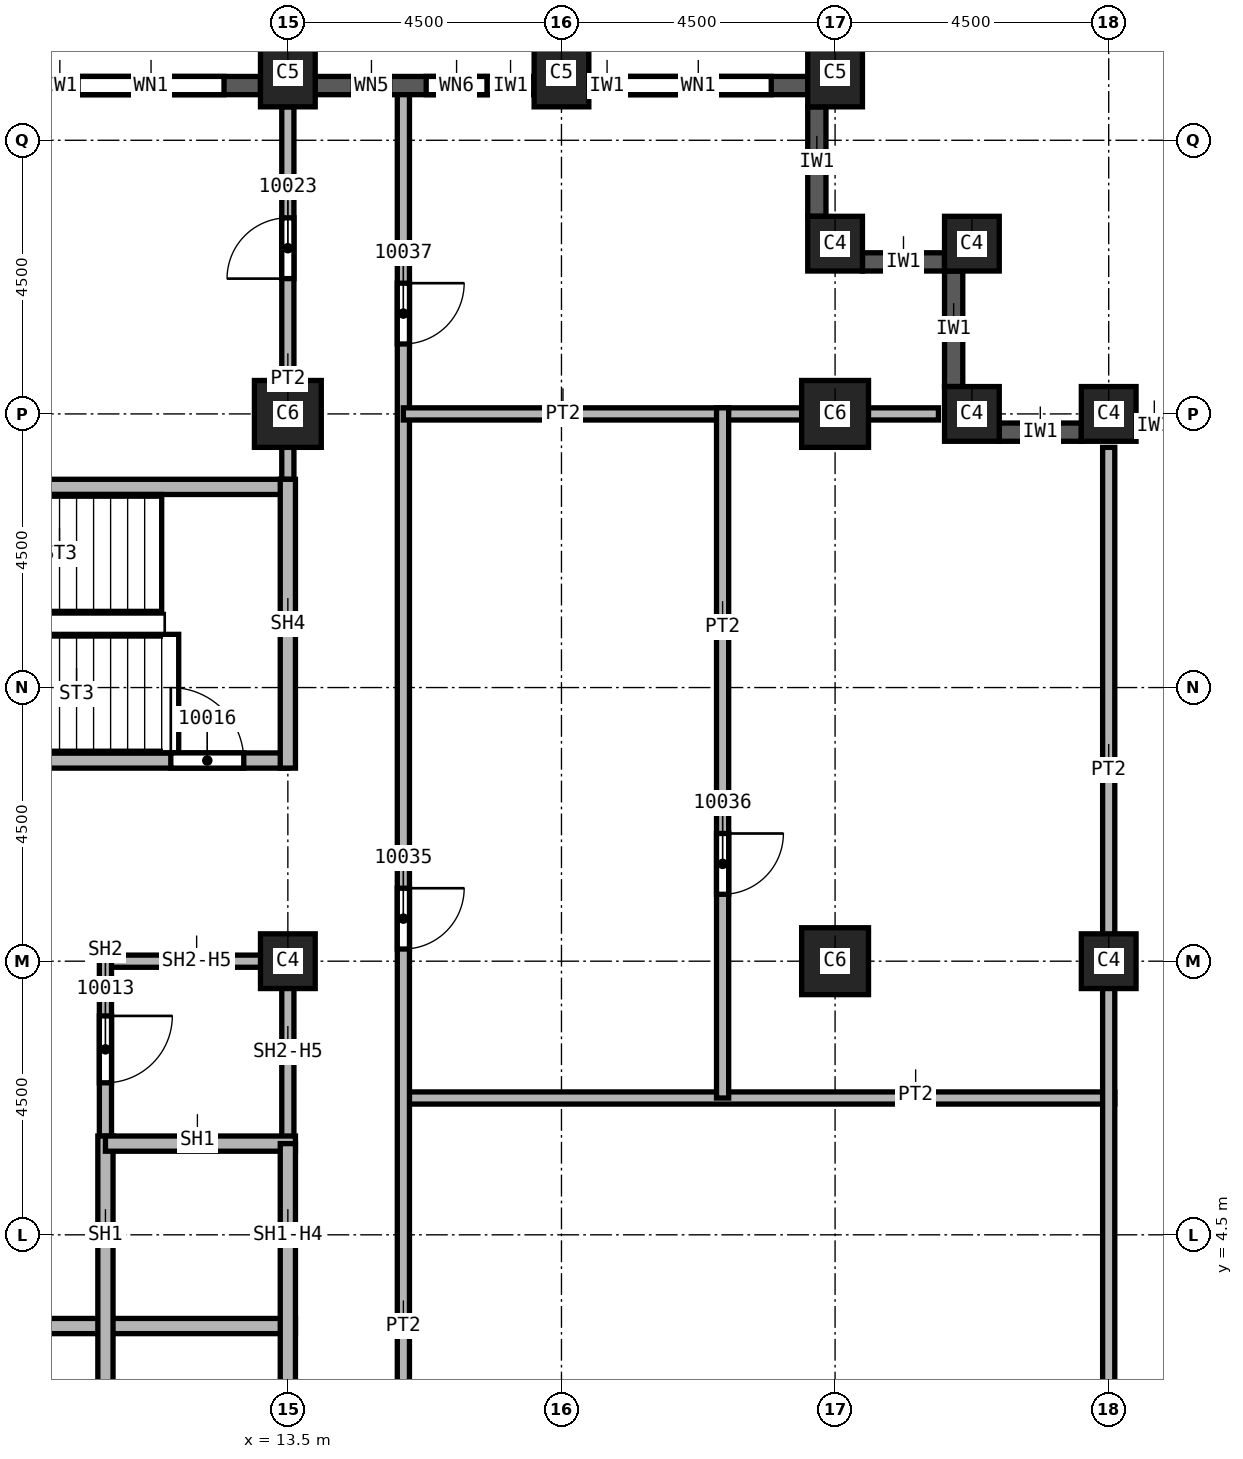
"""IFC4 building model, lengths in metres.
Left out: names, types, materials, properties, quantities, classifications, styles, units other than length and angle.
Written with IfcOpenShell. Run it as: python <this file> out.ifc"""

import sys

from ifc_helpers import new_model, si_unit, direction, frame, frame_2d, origin, origin_2d, place, context, subcontext, project, spatial, rectangle, extrude, element, fill, save


model = new_model("IFC4")
c1 = context("Model", 3, precision=1e-05, world=origin(), true_north=direction((0.0, 1.0)))
c2 = subcontext(c1, "Body", "Model", "MODEL_VIEW")
j1 = project(units=[si_unit("LENGTHUNIT", "METRE"), si_unit("PLANEANGLEUNIT", "RADIAN")], contexts=[c1])
p1 = place(None, origin())
s1 = spatial("IfcSite", under=j1, at=p1, CompositionType="ELEMENT")
p2 = place(p1, origin())
s2 = spatial("IfcBuilding", under=s1, at=p2, CompositionType="ELEMENT")
p3 = place(p2, frame((0.0, 0.0, 174.0)))
s3 = spatial("IfcBuildingStorey", under=s2, at=p3, CompositionType="ELEMENT", Elevation=174.0)
for number, where, z_axis, x_axis in (
    (1, (13.5, 18.0, 0.0), (0.0, 0.0, 1.0), (1.0, 0.0, 0.0)),
    (2, (22.5, 9.0, 0.0), (0.0, 0.0, 1.0), (1.0, 0.0, 0.0)),
    (3, (22.5, 18.0, 0.0), (0.0, 0.0, 1.0), (1.0, 0.0, 0.0)),
):
    element("IfcColumn", number, at=place(p3, frame(where, z_axis=z_axis, x_axis=x_axis)), inside=s3, PredefinedType="COLUMN", context=c2, shape_type="SweptSolid", body=[
        extrude(rectangle(XDim=1.1, YDim=1.1, at=origin_2d()), origin(), (0.0, 0.0, 1.0), 3.59),
    ])
for number, where, z_axis, x_axis in (
    (4, (13.5, 9.0, 0.0), (0.0, 0.0, 1.0), (1.0, 0.0, 0.0)),
    (5, (27.0, 9.0, 0.0), (0.0, 0.0, 1.0), (1.0, 0.0, 0.0)),
    (6, (27.0, 18.0, 0.0), (0.0, 0.0, 1.0), (1.0, 0.0, 0.0)),
):
    element("IfcColumn", number, at=place(p3, frame(where, z_axis=z_axis, x_axis=x_axis)), inside=s3, PredefinedType="COLUMN", context=c2, shape_type="SweptSolid", body=[
        extrude(rectangle(XDim=0.9, YDim=0.9, at=origin_2d()), origin(), (0.0, 0.0, 1.0), 3.59),
    ])
for number, where, z_axis, x_axis in (
    (7, (13.5, 23.6, 0.0), (0.0, 0.0, 1.0), (1.0, 0.0, 0.0)),
    (8, (18.0, 23.6, 0.0), (0.0, 0.0, 1.0), (1.0, 0.0, 0.0)),
    (9, (22.5, 23.6, 0.0), (0.0, 0.0, 1.0), (1.0, 0.0, 0.0)),
):
    element("IfcColumn", number, at=place(p3, frame(where, z_axis=z_axis, x_axis=x_axis)), inside=s3, PredefinedType="COLUMN", context=c2, shape_type="SweptSolid", body=[
        extrude(rectangle(XDim=0.9, YDim=1.1, at=origin_2d()), origin(), (0.0, 0.0, 1.0), 3.59),
    ])
for number, where, z_axis, x_axis in (
    (10, (22.5, 20.8, 0.0), (0.0, 0.0, 1.0), (1.0, 0.0, 0.0)),
    (11, (24.75, 20.8, 0.0), (0.0, 0.0, 1.0), (1.0, 0.0, 0.0)),
    (12, (24.75, 18.0, 0.0), (0.0, 0.0, 1.0), (1.0, 0.0, 0.0)),
):
    element("IfcColumn", number, at=place(p3, frame(where, z_axis=z_axis, x_axis=x_axis)), inside=s3, PredefinedType="COLUMN", context=c2, shape_type="SweptSolid", body=[
        extrude(rectangle(XDim=0.9, YDim=0.9, at=origin_2d()), origin(), (0.0, 0.0, 1.0), 3.59),
    ])
p4 = place(p3, frame((31.05, 17.8, 0.0), z_axis=(0.0, 0.0, 1.0), x_axis=(-1.0, 0.0, 0.0)))
e13 = element("IfcWall", 13, at=p4, inside=s3, PredefinedType="SOLIDWALL", context=c2, shape_type="SweptSolid", body=[
    extrude(rectangle(XDim=3.6, YDim=0.3, at=frame_2d((1.8, 0.0))), origin(), (0.0, 0.0, 1.0), 2.99),
])
p5 = place(p4, frame((0.6, 0.0, 0.8)))
e14 = element("IfcOpeningElement", 14, at=p5, cuts=e13, PredefinedType="OPENING", context=c2, shape_type="SweptSolid", body=[
    extrude(rectangle(XDim=1.0, YDim=1.95, at=frame_2d((0.5, 0.975))), frame((0.0, 0.15, 0.0), z_axis=(0.0, -1.0, 0.0), x_axis=(1.0, 0.0, 0.0)), (0.0, 0.0, 1.0), 0.3),
])
p6 = place(p4, frame((2.0, 0.0, 0.8)))
e15 = element("IfcOpeningElement", 15, at=p6, cuts=e13, PredefinedType="OPENING", context=c2, shape_type="SweptSolid", body=[
    extrude(rectangle(XDim=1.0, YDim=1.95, at=frame_2d((0.5, 0.975))), frame((0.0, 0.15, 0.0), z_axis=(0.0, -1.0, 0.0), x_axis=(1.0, 0.0, 0.0)), (0.0, 0.0, 1.0), 0.3),
])
p7 = place(p3, frame((26.55, 17.7, 0.0), z_axis=(0.0, 0.0, 1.0), x_axis=(-1.0, 0.0, 0.0)))
e16 = element("IfcWall", 16, at=p7, inside=s3, PredefinedType="SOLIDWALL", context=c2, shape_type="SweptSolid", body=[
    extrude(rectangle(XDim=1.35, YDim=0.3, at=frame_2d((0.675, 0.0))), origin(), (0.0, 0.0, 1.0), 2.99),
])
p8 = place(p3, frame((24.45, 18.45, 0.0), z_axis=(0.0, 0.0, 1.0), x_axis=(0.0, 1.0, 0.0)))
e17 = element("IfcWall", 17, at=p8, inside=s3, PredefinedType="SOLIDWALL", context=c2, shape_type="SweptSolid", body=[
    extrude(rectangle(XDim=1.9, YDim=0.3, at=frame_2d((0.95, 0.0))), origin(), (0.0, 0.0, 1.0), 2.99),
])
p9 = place(p3, frame((24.3, 20.5, 0.0), z_axis=(0.0, 0.0, 1.0), x_axis=(-1.0, 0.0, 0.0)))
e18 = element("IfcWall", 18, at=p9, inside=s3, PredefinedType="SOLIDWALL", context=c2, shape_type="SweptSolid", body=[
    extrude(rectangle(XDim=1.35, YDim=0.3, at=frame_2d((0.675, 0.0))), origin(), (0.0, 0.0, 1.0), 2.99),
])
p10 = place(p3, frame((22.2, 21.25, 0.0), z_axis=(0.0, 0.0, 1.0), x_axis=(0.0, 1.0, 0.0)))
e19 = element("IfcWall", 19, at=p10, inside=s3, PredefinedType="SOLIDWALL", context=c2, shape_type="SweptSolid", body=[
    extrude(rectangle(XDim=1.8, YDim=0.3, at=frame_2d((0.9, 0.0))), origin(), (0.0, 0.0, 1.0), 2.99),
])
p11 = place(p3, frame((22.05, 23.4, 0.0), z_axis=(0.0, 0.0, 1.0), x_axis=(-1.0, 0.0, 0.0)))
e20 = element("IfcWall", 20, at=p11, inside=s3, PredefinedType="SOLIDWALL", context=c2, shape_type="SweptSolid", body=[
    extrude(rectangle(XDim=3.6, YDim=0.3, at=frame_2d((1.8, 0.0))), origin(), (0.0, 0.0, 1.0), 2.99),
])
p12 = place(p11, frame((0.6, 0.0, 0.8)))
e21 = element("IfcOpeningElement", 21, at=p12, cuts=e20, PredefinedType="OPENING", context=c2, shape_type="SweptSolid", body=[
    extrude(rectangle(XDim=2.4, YDim=1.95, at=frame_2d((1.2, 0.975))), frame((0.0, 0.15, 0.0), z_axis=(0.0, -1.0, 0.0), x_axis=(1.0, 0.0, 0.0)), (0.0, 0.0, 1.0), 0.3),
])
p13 = place(p3, frame((17.55, 23.4, 0.0), z_axis=(0.0, 0.0, 1.0), x_axis=(-1.0, 0.0, 0.0)))
e22 = element("IfcWall", 22, at=p13, inside=s3, PredefinedType="SOLIDWALL", context=c2, shape_type="SweptSolid", body=[
    extrude(rectangle(XDim=3.6, YDim=0.3, at=frame_2d((1.8, 0.0))), origin(), (0.0, 0.0, 1.0), 2.99),
])
p14 = place(p13, frame((0.775, 0.0, 0.8)))
e23 = element("IfcOpeningElement", 23, at=p14, cuts=e22, PredefinedType="OPENING", context=c2, shape_type="SweptSolid", body=[
    extrude(rectangle(XDim=1.0, YDim=1.95, at=frame_2d((0.5, 0.975))), frame((0.0, 0.15, 0.0), z_axis=(0.0, -1.0, 0.0), x_axis=(1.0, 0.0, 0.0)), (0.0, 0.0, 1.0), 0.3),
])
p15 = place(p13, frame((2.375, 0.0, 0.8)))
e24 = element("IfcOpeningElement", 24, at=p15, cuts=e22, PredefinedType="OPENING", context=c2, shape_type="SweptSolid", body=[
    extrude(rectangle(XDim=0.6, YDim=1.95, at=frame_2d((0.3, 0.975))), frame((0.0, 0.15, 0.0), z_axis=(0.0, -1.0, 0.0), x_axis=(1.0, 0.0, 0.0)), (0.0, 0.0, 1.0), 0.3),
])
p16 = place(p3, frame((13.05, 23.4, 0.0), z_axis=(0.0, 0.0, 1.0), x_axis=(-1.0, 0.0, 0.0)))
e25 = element("IfcWall", 25, at=p16, inside=s3, PredefinedType="SOLIDWALL", context=c2, shape_type="SweptSolid", body=[
    extrude(rectangle(XDim=3.6, YDim=0.3, at=frame_2d((1.8, 0.0))), origin(), (0.0, 0.0, 1.0), 2.99),
])
p17 = place(p16, frame((0.6, 0.0, 0.8)))
e26 = element("IfcOpeningElement", 26, at=p17, cuts=e25, PredefinedType="OPENING", context=c2, shape_type="SweptSolid", body=[
    extrude(rectangle(XDim=2.4, YDim=1.95, at=frame_2d((1.2, 0.975))), frame((0.0, 0.15, 0.0), z_axis=(0.0, -1.0, 0.0), x_axis=(1.0, 0.0, 0.0)), (0.0, 0.0, 1.0), 0.3),
])
p18 = place(p3, frame((13.5, 16.675, 0.0), z_axis=(0.0, 0.0, 1.0), x_axis=(0.0, 1.0, 0.0)))
e27 = element("IfcWall", 27, at=p18, inside=s3, PredefinedType="PARTITIONING", context=c2, shape_type="SweptSolid", body=[
    extrude(rectangle(XDim=6.375, YDim=0.2, at=frame_2d((3.188, 0.0))), origin(), (0.0, 0.0, 1.0), 3.59),
])
p19 = place(p18, frame((3.55, 0.0, 0.0)))
e28 = element("IfcOpeningElement", 28, at=p19, cuts=e27, PredefinedType="OPENING", context=c2, shape_type="SweptSolid", body=[
    extrude(rectangle(XDim=1.0, YDim=2.1, at=frame_2d((0.5, 1.05))), frame((0.0, 0.1, 0.0), z_axis=(0.0, -1.0, 0.0), x_axis=(1.0, 0.0, 0.0)), (0.0, 0.0, 1.0), 0.2),
])
p20 = place(p3, frame((15.4, 6.75, 0.0), z_axis=(0.0, 0.0, 1.0), x_axis=(1.0, 0.0, 0.0)))
e29 = element("IfcWall", 29, at=p20, inside=s3, PredefinedType="PARTITIONING", context=c2, shape_type="SweptSolid", body=[
    extrude(rectangle(XDim=11.7, YDim=0.2, at=frame_2d((5.85, 0.0))), origin(), (0.0, 0.0, 1.0), 3.59),
])
p21 = place(p3, frame((15.4, 23.25, 0.0), z_axis=(0.0, 0.0, 1.0), x_axis=(0.0, -1.0, 0.0)))
e30 = element("IfcWall", 30, at=p21, inside=s3, PredefinedType="PARTITIONING", context=c2, shape_type="SweptSolid", body=[
    extrude(rectangle(XDim=24.1, YDim=0.2, at=frame_2d((12.05, 0.0))), origin(), (0.0, 0.0, 1.0), 3.59),
])
p22 = place(p21, frame((13.05, 0.0, 0.0)))
e31 = element("IfcOpeningElement", 31, at=p22, cuts=e30, PredefinedType="OPENING", context=c2, shape_type="SweptSolid", body=[
    extrude(rectangle(XDim=1.0, YDim=2.1, at=frame_2d((0.5, 1.05))), frame((0.0, 0.1, 0.0), z_axis=(0.0, -1.0, 0.0), x_axis=(1.0, 0.0, 0.0)), (0.0, 0.0, 1.0), 0.2),
])
p23 = place(p21, frame((3.1, 0.0, 0.0)))
e32 = element("IfcOpeningElement", 32, at=p23, cuts=e30, PredefinedType="OPENING", context=c2, shape_type="SweptSolid", body=[
    extrude(rectangle(XDim=1.0, YDim=2.1, at=frame_2d((0.5, 1.05))), frame((0.0, 0.1, 0.0), z_axis=(0.0, -1.0, 0.0), x_axis=(1.0, 0.0, 0.0)), (0.0, 0.0, 1.0), 0.2),
])
p24 = place(p3, frame((15.4, 18.0, 0.0), z_axis=(0.0, 0.0, 1.0), x_axis=(1.0, 0.0, 0.0)))
e33 = element("IfcWall", 33, at=p24, inside=s3, PredefinedType="PARTITIONING", context=c2, shape_type="SweptSolid", body=[
    extrude(rectangle(XDim=8.8, YDim=0.2, at=frame_2d((4.4, 0.0))), origin(), (0.0, 0.0, 1.0), 3.59),
])
p25 = place(p3, frame((20.65, 18.1, 0.0), z_axis=(0.0, 0.0, 1.0), x_axis=(0.0, -1.0, 0.0)))
e34 = element("IfcWall", 34, at=p25, inside=s3, PredefinedType="PARTITIONING", context=c2, shape_type="SweptSolid", body=[
    extrude(rectangle(XDim=11.35, YDim=0.2, at=frame_2d((5.675, 0.0))), origin(), (0.0, 0.0, 1.0), 3.59),
])
p26 = place(p25, frame((7.0, 0.0, 0.0)))
e35 = element("IfcOpeningElement", 35, at=p26, cuts=e34, PredefinedType="OPENING", context=c2, shape_type="SweptSolid", body=[
    extrude(rectangle(XDim=1.0, YDim=2.1, at=frame_2d((0.5, 1.05))), frame((0.0, 0.1, 0.0), z_axis=(0.0, -1.0, 0.0), x_axis=(1.0, 0.0, 0.0)), (0.0, 0.0, 1.0), 0.2),
])
p27 = place(p3, frame((27.0, 17.45, 0.0), z_axis=(0.0, 0.0, 1.0), x_axis=(0.0, -1.0, 0.0)))
e36 = element("IfcWall", 36, at=p27, inside=s3, PredefinedType="PARTITIONING", context=c2, shape_type="SweptSolid", body=[
    extrude(rectangle(XDim=18.2, YDim=0.2, at=frame_2d((9.1, 0.0))), origin(), (0.0, 0.0, 1.0), 3.59),
])
p28 = place(p3, frame((10.5, 9.0, 0.0), z_axis=(0.0, 0.0, 1.0), x_axis=(1.0, 0.0, 0.0)))
e37 = element("IfcWall", 37, at=p28, inside=s3, PredefinedType="SOLIDWALL", context=c2, shape_type="SweptSolid", body=[
    extrude(rectangle(XDim=3.0, YDim=0.2, at=frame_2d((1.5, 0.0))), origin(), (0.0, 0.0, 1.0), 2.828),
])
p29 = place(p3, frame((10.5, 9.1, 0.0), z_axis=(0.0, 0.0, 1.0), x_axis=(0.0, -1.0, 0.0)))
e38 = element("IfcWall", 38, at=p29, inside=s3, PredefinedType="SOLIDWALL", context=c2, shape_type="SweptSolid", body=[
    extrude(rectangle(XDim=3.225, YDim=0.2, at=frame_2d((1.613, 0.0))), origin(), (0.0, 0.0, 1.0), 3.59),
])
p30 = place(p29, frame((1.0, 0.0, 0.0)))
e39 = element("IfcOpeningElement", 39, at=p30, cuts=e38, PredefinedType="OPENING", context=c2, shape_type="SweptSolid", body=[
    extrude(rectangle(XDim=1.1, YDim=2.1, at=frame_2d((0.55, 1.05))), frame((0.0, 0.1, 0.0), z_axis=(0.0, -1.0, 0.0), x_axis=(1.0, 0.0, 0.0)), (0.0, 0.0, 1.0), 0.2),
])
p31 = place(p3, frame((13.5, 9.1, 0.0), z_axis=(0.0, 0.0, 1.0), x_axis=(0.0, -1.0, 0.0)))
e40 = element("IfcWall", 40, at=p31, inside=s3, PredefinedType="SOLIDWALL", context=c2, shape_type="SweptSolid", body=[
    extrude(rectangle(XDim=3.1, YDim=0.2, at=frame_2d((1.55, 0.0))), origin(), (0.0, 0.0, 1.0), 2.828),
])
p32 = place(p3, frame((4.375, 3.0, 0.0), z_axis=(0.0, 0.0, 1.0), x_axis=(1.0, 0.0, 0.0)))
e41 = element("IfcWall", 41, at=p32, inside=s3, PredefinedType="SOLIDWALL", context=c2, shape_type="SweptSolid", body=[
    extrude(rectangle(XDim=9.25, YDim=0.25, at=frame_2d((4.625, 0.0))), origin(), (0.0, 0.0, 1.0), 3.59),
])
p33 = place(p32, frame((3.375, 0.0, 0.0)))
e42 = element("IfcOpeningElement", 42, at=p33, cuts=e41, PredefinedType="OPENING", context=c2, shape_type="SweptSolid", body=[
    extrude(rectangle(XDim=1.1, YDim=2.1, at=frame_2d((0.55, 1.05))), frame((0.0, 0.125, 0.0), z_axis=(0.0, -1.0, 0.0), x_axis=(1.0, 0.0, 0.0)), (0.0, 0.0, 1.0), 0.25),
])
p34 = place(p3, frame((10.5, 6.125, 0.0), z_axis=(0.0, 0.0, 1.0), x_axis=(0.0, -1.0, 0.0)))
e43 = element("IfcWall", 43, at=p34, inside=s3, PredefinedType="SOLIDWALL", context=c2, shape_type="SweptSolid", body=[
    extrude(rectangle(XDim=9.25, YDim=0.25, at=frame_2d((4.625, 0.0))), origin(), (0.0, 0.0, 1.0), 3.59),
])
p35 = place(p34, frame((7.075, 0.0, 0.0)))
e44 = element("IfcOpeningElement", 44, at=p35, cuts=e43, PredefinedType="OPENING", context=c2, shape_type="SweptSolid", body=[
    extrude(rectangle(XDim=1.1, YDim=2.1, at=frame_2d((0.55, 1.05))), frame((0.0, 0.125, 0.0), z_axis=(0.0, -1.0, 0.0), x_axis=(1.0, 0.0, 0.0)), (0.0, 0.0, 1.0), 0.25),
])
p36 = place(p34, frame((4.075, 0.0, 0.0)))
e45 = element("IfcOpeningElement", 45, at=p36, cuts=e43, PredefinedType="OPENING", context=c2, shape_type="SweptSolid", body=[
    extrude(rectangle(XDim=1.1, YDim=2.1, at=frame_2d((0.55, 1.05))), frame((0.0, 0.125, 0.0), z_axis=(0.0, -1.0, 0.0), x_axis=(1.0, 0.0, 0.0)), (0.0, 0.0, 1.0), 0.25),
])
p37 = place(p3, frame((10.5, 6.0, 0.0), z_axis=(0.0, 0.0, 1.0), x_axis=(1.0, 0.0, 0.0)))
e46 = element("IfcWall", 46, at=p37, inside=s3, PredefinedType="SOLIDWALL", context=c2, shape_type="SweptSolid", body=[
    extrude(rectangle(XDim=3.125, YDim=0.25, at=frame_2d((1.562, 0.0))), origin(), (0.0, 0.0, 1.0), 3.59),
])
p38 = place(p3, frame((13.5, 6.0, 0.0), z_axis=(0.0, 0.0, 1.0), x_axis=(0.0, -1.0, 0.0)))
e47 = element("IfcWall", 47, at=p38, inside=s3, PredefinedType="SOLIDWALL", context=c2, shape_type="SweptSolid", body=[
    extrude(rectangle(XDim=9.0, YDim=0.25, at=frame_2d((4.5, 0.0))), origin(), (0.0, 0.0, 1.0), 2.828),
])
p39 = place(p3, frame((4.375, 12.3, 0.0), z_axis=(0.0, 0.0, 1.0), x_axis=(1.0, 0.0, 0.0)))
e48 = element("IfcWall", 48, at=p39, inside=s3, PredefinedType="SOLIDWALL", context=c2, shape_type="SweptSolid", body=[
    extrude(rectangle(XDim=9.125, YDim=0.25, at=frame_2d((4.562, 0.0))), origin(), (0.0, 0.0, 1.0), 3.59),
])
p40 = place(p39, frame((7.2, 0.0, 0.0)))
e49 = element("IfcOpeningElement", 49, at=p40, cuts=e48, PredefinedType="OPENING", context=c2, shape_type="SweptSolid", body=[
    extrude(rectangle(XDim=1.2, YDim=2.1, at=frame_2d((0.6, 1.05))), frame((0.0, 0.125, 0.0), z_axis=(0.0, -1.0, 0.0), x_axis=(1.0, 0.0, 0.0)), (0.0, 0.0, 1.0), 0.25),
])
p41 = place(p3, frame((4.375, 16.8, 0.0), z_axis=(0.0, 0.0, 1.0), x_axis=(1.0, 0.0, 0.0)))
e50 = element("IfcWall", 50, at=p41, inside=s3, PredefinedType="SOLIDWALL", context=c2, shape_type="SweptSolid", body=[
    extrude(rectangle(XDim=9.125, YDim=0.25, at=frame_2d((4.562, 0.0))), origin(), (0.0, 0.0, 1.0), 3.59),
])
p42 = place(p3, frame((13.5, 12.175, 0.0), z_axis=(0.0, 0.0, 1.0), x_axis=(0.0, 1.0, 0.0)))
e51 = element("IfcWall", 51, at=p42, inside=s3, PredefinedType="SOLIDWALL", context=c2, shape_type="SweptSolid", body=[
    extrude(rectangle(XDim=4.75, YDim=0.25, at=frame_2d((2.375, 0.0))), origin(), (0.0, 0.0, 1.0), 3.59),
])
p43 = place(p12, origin())
e52 = element("IfcWindow", 52, at=p43, inside=s3, PartitioningType="SINGLE_PANEL", PredefinedType="WINDOW", context=c2, shape_type="SweptSolid", body=[
    extrude(rectangle(XDim=2.4, YDim=1.95, at=frame_2d((1.2, 0.975))), frame((0.0, 0.03, 0.0), z_axis=(0.0, -1.0, 0.0), x_axis=(1.0, 0.0, 0.0)), (0.0, 0.0, 1.0), 0.06),
])
fill(e21, e52)
p44 = place(p17, origin())
e53 = element("IfcWindow", 53, at=p44, inside=s3, PartitioningType="SINGLE_PANEL", PredefinedType="WINDOW", context=c2, shape_type="SweptSolid", body=[
    extrude(rectangle(XDim=2.4, YDim=1.95, at=frame_2d((1.2, 0.975))), frame((0.0, 0.03, 0.0), z_axis=(0.0, -1.0, 0.0), x_axis=(1.0, 0.0, 0.0)), (0.0, 0.0, 1.0), 0.06),
])
fill(e26, e53)
p45 = place(p30, origin())
e54 = element("IfcDoor", 54, at=p45, inside=s3, OperationType="SINGLE_SWING_RIGHT", PredefinedType="DOOR", context=c2, shape_type="SweptSolid", body=[
    extrude(rectangle(XDim=1.1, YDim=2.1, at=frame_2d((0.55, 1.05))), frame((0.0, 0.025, 0.0), z_axis=(0.0, -1.0, 0.0), x_axis=(1.0, 0.0, 0.0)), (0.0, 0.0, 1.0), 0.05),
])
fill(e39, e54)
p46 = place(p40, origin())
e55 = element("IfcDoor", 55, at=p46, inside=s3, OperationType="SINGLE_SWING_LEFT", PredefinedType="DOOR", context=c2, shape_type="SweptSolid", body=[
    extrude(rectangle(XDim=1.2, YDim=2.1, at=frame_2d((0.6, 1.05))), frame((0.0, 0.025, 0.0), z_axis=(0.0, -1.0, 0.0), x_axis=(1.0, 0.0, 0.0)), (0.0, 0.0, 1.0), 0.05),
])
fill(e49, e55)
p47 = place(p19, origin())
e56 = element("IfcDoor", 56, at=p47, inside=s3, OperationType="SINGLE_SWING_RIGHT", PredefinedType="DOOR", context=c2, shape_type="SweptSolid", body=[
    extrude(rectangle(XDim=1.0, YDim=2.1, at=frame_2d((0.5, 1.05))), frame((0.0, 0.025, 0.0), z_axis=(0.0, -1.0, 0.0), x_axis=(1.0, 0.0, 0.0)), (0.0, 0.0, 1.0), 0.05),
])
fill(e28, e56)
p48 = place(p22, origin())
e57 = element("IfcDoor", 57, at=p48, inside=s3, OperationType="SINGLE_SWING_RIGHT", PredefinedType="DOOR", context=c2, shape_type="SweptSolid", body=[
    extrude(rectangle(XDim=1.0, YDim=2.1, at=frame_2d((0.5, 1.05))), frame((0.0, 0.025, 0.0), z_axis=(0.0, -1.0, 0.0), x_axis=(1.0, 0.0, 0.0)), (0.0, 0.0, 1.0), 0.05),
])
fill(e31, e57)
p49 = place(p26, origin())
e58 = element("IfcDoor", 58, at=p49, inside=s3, OperationType="SINGLE_SWING_LEFT", PredefinedType="DOOR", context=c2, shape_type="SweptSolid", body=[
    extrude(rectangle(XDim=1.0, YDim=2.1, at=frame_2d((0.5, 1.05))), frame((0.0, 0.025, 0.0), z_axis=(0.0, -1.0, 0.0), x_axis=(1.0, 0.0, 0.0)), (0.0, 0.0, 1.0), 0.05),
])
fill(e35, e58)
p50 = place(p23, origin())
e59 = element("IfcDoor", 59, at=p50, inside=s3, OperationType="SINGLE_SWING_RIGHT", PredefinedType="DOOR", context=c2, shape_type="SweptSolid", body=[
    extrude(rectangle(XDim=1.0, YDim=2.1, at=frame_2d((0.5, 1.05))), frame((0.0, 0.025, 0.0), z_axis=(0.0, -1.0, 0.0), x_axis=(1.0, 0.0, 0.0)), (0.0, 0.0, 1.0), 0.05),
])
fill(e32, e59)
p51 = place(p14, origin())
e60 = element("IfcWindow", 60, at=p51, inside=s3, PartitioningType="SINGLE_PANEL", PredefinedType="WINDOW", context=c2, shape_type="SweptSolid", body=[
    extrude(rectangle(XDim=1.0, YDim=1.95, at=frame_2d((0.5, 0.975))), frame((0.0, 0.03, 0.0), z_axis=(0.0, -1.0, 0.0), x_axis=(1.0, 0.0, 0.0)), (0.0, 0.0, 1.0), 0.06),
])
fill(e23, e60)
p52 = place(p15, origin())
e61 = element("IfcWindow", 61, at=p52, inside=s3, PartitioningType="SINGLE_PANEL", PredefinedType="WINDOW", context=c2, shape_type="SweptSolid", body=[
    extrude(rectangle(XDim=0.6, YDim=1.95, at=frame_2d((0.3, 0.975))), frame((0.0, 0.03, 0.0), z_axis=(0.0, -1.0, 0.0), x_axis=(1.0, 0.0, 0.0)), (0.0, 0.0, 1.0), 0.06),
])
fill(e24, e61)
save(model, sys.argv[1])
